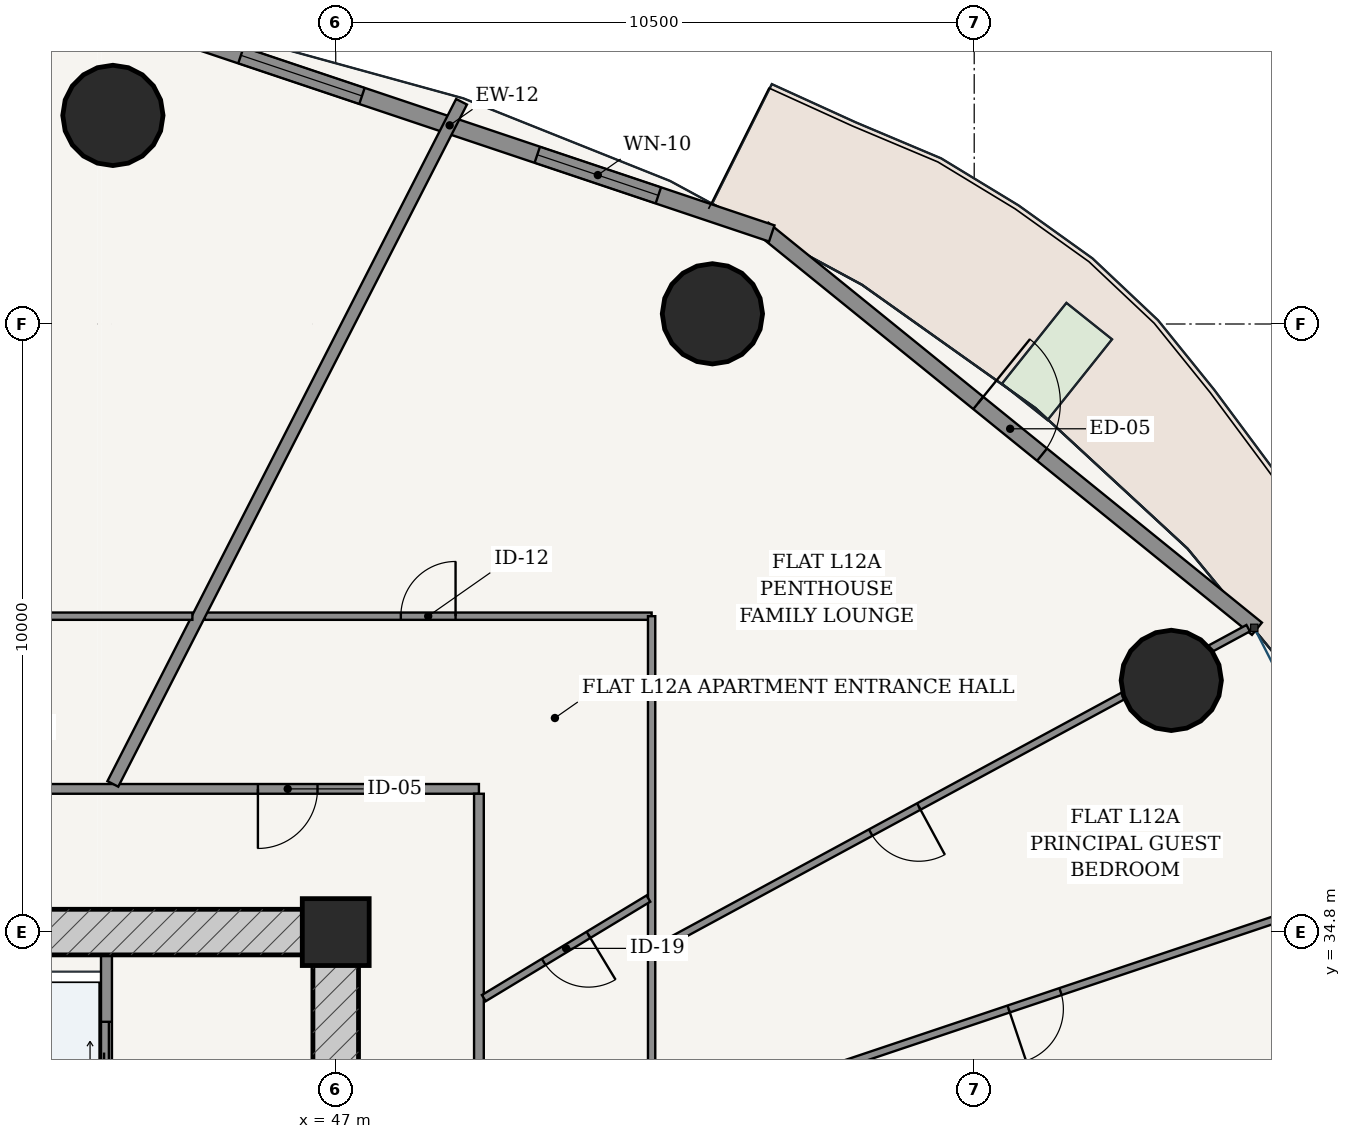
"""IFC4 building model, lengths in metres.
Left out: names, types, materials, properties, quantities, classifications, styles, units other than length and angle.
Written with IfcOpenShell. Run it as: python <this file> out.ifc"""

import sys

from ifc_helpers import new_model, si_unit, direction, frame, frame_2d, origin, origin_2d, place, context, subcontext, project, spatial, rectangle, hollow_circle, extrude, source, transform, mapped, element, fill, save


model = new_model("IFC4")
c1 = context("Model", 3, precision=1e-05, world=origin(), true_north=direction((-0.2419218956, 0.970295726276)))
c2 = subcontext(c1, "Body", "Model", "MODEL_VIEW")
j1 = project(units=[si_unit("LENGTHUNIT", "METRE"), si_unit("PLANEANGLEUNIT", "RADIAN")], contexts=[c1])
p1 = place(None, origin())
s1 = spatial("IfcSite", under=j1, at=p1, CompositionType="ELEMENT")
p2 = place(p1, origin())
s2 = spatial("IfcBuilding", under=s1, at=p2, CompositionType="ELEMENT")
p3 = place(p2, frame((0.0, 0.0, 49.2)))
s3 = spatial("IfcBuildingStorey", under=s2, at=p3, CompositionType="ELEMENT", Elevation=49.2)
p4 = place(p3, frame((47.0, 34.8, 0.0), z_axis=(0.0, 0.0, 1.0), x_axis=(1.0, 0.0, 0.0)))
e1 = element("IfcColumn", 1, at=p4, inside=s3, PredefinedType="COLUMN", context=c2, shape_type="SweptSolid", body=[
    extrude(rectangle(XDim=1.1, YDim=1.1, at=origin_2d()), origin(), (0.0, 0.0, 1.0), 3.6),
])
p5 = place(p3, frame((28.625, 34.8, 0.0), z_axis=(0.0, 0.0, 1.0), x_axis=(1.0, 0.0, 0.0)))
e2 = element("IfcWall", 2, at=p5, inside=s3, PredefinedType="SHEAR", context=c2, shape_type="SweptSolid", body=[
    extrude(rectangle(XDim=18.75, YDim=0.75, at=frame_2d((9.375, 0.0))), origin(), (0.0, 0.0, 1.0), 3.32),
])
p6 = place(p5, frame((6.887, 0.0, 0.0)))
e3 = element("IfcOpeningElement", 3, at=p6, cuts=e2, PredefinedType="OPENING", context=c2, shape_type="SweptSolid", body=[
    extrude(rectangle(XDim=0.85, YDim=2.1, at=frame_2d((0.425, 1.05))), frame((0.0, 0.385, 0.0), z_axis=(0.0, -1.0, 0.0), x_axis=(1.0, 0.0, 0.0)), (0.0, 0.0, 1.0), 0.77),
])
p7 = place(p5, frame((8.945, 0.0, 0.0)))
e4 = element("IfcOpeningElement", 4, at=p7, cuts=e2, PredefinedType="OPENING", context=c2, shape_type="SweptSolid", body=[
    extrude(rectangle(XDim=0.86, YDim=2.1, at=frame_2d((0.43, 1.05))), frame((0.0, 0.385, 0.0), z_axis=(0.0, -1.0, 0.0), x_axis=(1.0, 0.0, 0.0)), (0.0, 0.0, 1.0), 0.77),
])
p8 = place(p5, frame((11.012, 0.0, 0.0)))
e5 = element("IfcOpeningElement", 5, at=p8, cuts=e2, PredefinedType="OPENING", context=c2, shape_type="SweptSolid", body=[
    extrude(rectangle(XDim=0.85, YDim=2.1, at=frame_2d((0.425, 1.05))), frame((0.0, 0.385, 0.0), z_axis=(0.0, -1.0, 0.0), x_axis=(1.0, 0.0, 0.0)), (0.0, 0.0, 1.0), 0.77),
])
p9 = place(p3, frame((47.0, 19.175, 0.0), z_axis=(0.0, 0.0, 1.0), x_axis=(0.0, 1.0, 0.0)))
e6 = element("IfcWall", 6, at=p9, inside=s3, PredefinedType="SHEAR", context=c2, shape_type="SweptSolid", body=[
    extrude(rectangle(XDim=15.25, YDim=0.75, at=frame_2d((7.625, 0.0))), origin(), (0.0, 0.0, 1.0), 3.32),
])
p10 = place(p9, frame((9.875, 0.0, 0.0)))
e7 = element("IfcOpeningElement", 7, at=p10, cuts=e6, PredefinedType="OPENING", context=c2, shape_type="SweptSolid", body=[
    extrude(rectangle(XDim=1.5, YDim=2.2, at=frame_2d((0.75, 1.1))), frame((0.0, 0.385, 0.0), z_axis=(0.0, -1.0, 0.0), x_axis=(1.0, 0.0, 0.0)), (0.0, 0.0, 1.0), 0.77),
])
for number, where, z_axis, x_axis in (
    (8, (60.741, 38.939, 0.0), (0.0, 0.0, 1.0), (1.0, 0.0, 0.0)),
    (9, (53.195, 44.968, 0.0), (0.0, 0.0, 1.0), (1.0, 0.0, 0.0)),
    (10, (43.336, 48.23, 0.0), (0.0, 0.0, 1.0), (1.0, 0.0, 0.0)),
):
    element("IfcColumn", number, at=place(p3, frame(where, z_axis=z_axis, x_axis=x_axis)), inside=s3, PredefinedType="COLUMN", context=c2, shape_type="SweptSolid", body=[
        extrude(hollow_circle(Radius=0.825, WallThickness=0.05, at=origin_2d()), origin(), (0.0, 0.0, 1.0), 3.6),
    ])
p11 = place(p3, frame((62.15, 39.789, 0.0), z_axis=(0.0, 0.0, 1.0), x_axis=(-0.777005352078, 0.62949398952, 0.0)))
e11 = element("IfcWall", 11, at=p11, inside=s3, PredefinedType="SOLIDWALL", context=c2, shape_type="SweptSolid", body=[
    extrude(rectangle(XDim=10.447, YDim=0.26, at=frame_2d((5.223, 0.0))), origin(), (0.0, 0.0, 1.0), 3.32),
])
p12 = place(p11, frame((4.548, 0.0, 0.0)))
e12 = element("IfcOpeningElement", 12, at=p12, cuts=e11, PredefinedType="OPENING", context=c2, shape_type="SweptSolid", body=[
    extrude(rectangle(XDim=1.35, YDim=2.2, at=frame_2d((0.675, 1.1))), frame((0.0, 0.14, 0.0), z_axis=(0.0, -1.0, 0.0), x_axis=(1.0, 0.0, 0.0)), (0.0, 0.0, 1.0), 0.28),
])
p13 = place(p3, frame((54.171, 46.289, 0.0), z_axis=(0.0, 0.0, 1.0), x_axis=(-0.948041258496, 0.318147406385, 0.0)))
e13 = element("IfcWall", 13, at=p13, inside=s3, PredefinedType="SOLIDWALL", context=c2, shape_type="SweptSolid", body=[
    extrude(rectangle(XDim=11.175, YDim=0.28, at=frame_2d((5.588, 0.0))), origin(), (0.0, 0.0, 1.0), 3.32),
])
p14 = place(p13, frame((1.967, 0.0, 0.85)))
e14 = element("IfcOpeningElement", 14, at=p14, cuts=e13, PredefinedType="OPENING", context=c2, shape_type="SweptSolid", body=[
    extrude(rectangle(XDim=2.1, YDim=1.95, at=frame_2d((1.05, 0.975))), frame((0.0, 0.15, 0.0), z_axis=(0.0, -1.0, 0.0), x_axis=(1.0, 0.0, 0.0)), (0.0, 0.0, 1.0), 0.3),
])
p15 = place(p13, frame((7.108, 0.0, 0.85)))
e15 = element("IfcOpeningElement", 15, at=p15, cuts=e13, PredefinedType="OPENING", context=c2, shape_type="SweptSolid", body=[
    extrude(rectangle(XDim=2.1, YDim=1.95, at=frame_2d((1.05, 0.975))), frame((0.0, 0.15, 0.0), z_axis=(0.0, -1.0, 0.0), x_axis=(1.0, 0.0, 0.0)), (0.0, 0.0, 1.0), 0.3),
])
p16 = place(p3, frame((43.23, 28.52, 0.0), z_axis=(0.0, 0.0, 1.0), x_axis=(0.0, 1.0, 0.0)))
e16 = element("IfcWall", 16, at=p16, inside=s3, PredefinedType="PARTITIONING", context=c2, shape_type="SweptSolid", body=[
    extrude(rectangle(XDim=5.905, YDim=0.18, at=frame_2d((2.953, 0.0))), origin(), (0.0, 0.0, 1.0), 3.32),
])
p17 = place(p16, frame((0.905, 0.0, 0.0)))
e17 = element("IfcOpeningElement", 17, at=p17, cuts=e16, PredefinedType="OPENING", context=c2, shape_type="SweptSolid", body=[
    extrude(rectangle(XDim=0.85, YDim=2.1, at=frame_2d((0.425, 1.05))), frame((0.0, 0.1, 0.0), z_axis=(0.0, -1.0, 0.0), x_axis=(1.0, 0.0, 0.0)), (0.0, 0.0, 1.0), 0.2),
])
p18 = place(p16, frame((3.655, 0.0, 0.0)))
e18 = element("IfcOpeningElement", 18, at=p18, cuts=e16, PredefinedType="OPENING", context=c2, shape_type="SweptSolid", body=[
    extrude(rectangle(XDim=1.15, YDim=2.2, at=frame_2d((0.575, 1.1))), frame((0.0, 0.1, 0.0), z_axis=(0.0, -1.0, 0.0), x_axis=(1.0, 0.0, 0.0)), (0.0, 0.0, 1.0), 0.2),
])
p19 = place(p3, frame((26.645, 37.155, 0.0), z_axis=(0.0, 0.0, 1.0), x_axis=(1.0, 0.0, 0.0)))
e19 = element("IfcWall", 19, at=p19, inside=s3, PredefinedType="PARTITIONING", context=c2, shape_type="SweptSolid", body=[
    extrude(rectangle(XDim=22.71, YDim=0.16, at=frame_2d((11.355, 0.0))), origin(), (0.0, 0.0, 1.0), 2.688),
])
p20 = place(p19, frame((19.075, 0.0, 0.0)))
e20 = element("IfcOpeningElement", 20, at=p20, cuts=e19, PredefinedType="OPENING", context=c2, shape_type="SweptSolid", body=[
    extrude(rectangle(XDim=0.98, YDim=2.2, at=frame_2d((0.49, 1.1))), frame((0.0, 0.09, 0.0), z_axis=(0.0, -1.0, 0.0), x_axis=(1.0, 0.0, 0.0)), (0.0, 0.0, 1.0), 0.18),
])
p21 = place(p19, frame((6.221, 0.0, 0.0)))
e21 = element("IfcOpeningElement", 21, at=p21, cuts=e19, PredefinedType="OPENING", context=c2, shape_type="SweptSolid", body=[
    extrude(rectangle(XDim=0.98, YDim=2.2, at=frame_2d((0.49, 1.1))), frame((0.0, 0.09, 0.0), z_axis=(0.0, -1.0, 0.0), x_axis=(1.0, 0.0, 0.0)), (0.0, 0.0, 1.0), 0.18),
])
p22 = place(p3, frame((49.355, 16.525, 0.0), z_axis=(0.0, 0.0, 1.0), x_axis=(0.0, 1.0, 0.0)))
e22 = element("IfcWall", 22, at=p22, inside=s3, PredefinedType="PARTITIONING", context=c2, shape_type="SweptSolid", body=[
    extrude(rectangle(XDim=20.55, YDim=0.16, at=frame_2d((10.275, 0.0))), origin(), (0.0, 0.0, 1.0), 2.688),
])
p23 = place(p3, frame((44.847, 39.995, 0.0), z_axis=(0.0, 0.0, 1.0), x_axis=(1.0, 0.0, 0.0)))
e23 = element("IfcWall", 23, at=p23, inside=s3, PredefinedType="PARTITIONING", context=c2, shape_type="SweptSolid", body=[
    extrude(rectangle(XDim=7.348, YDim=0.12, at=frame_2d((3.674, 0.0))), origin(), (0.0, 0.0, 1.0), 2.688),
])
p24 = place(p23, frame((3.224, 0.0, 0.0)))
e24 = element("IfcOpeningElement", 24, at=p24, cuts=e23, PredefinedType="OPENING", context=c2, shape_type="SweptSolid", body=[
    extrude(rectangle(XDim=0.9, YDim=2.15, at=frame_2d((0.45, 1.075))), frame((0.0, 0.07, 0.0), z_axis=(0.0, -1.0, 0.0), x_axis=(1.0, 0.0, 0.0)), (0.0, 0.0, 1.0), 0.14),
])
p25 = place(p3, frame((52.195, 39.995, 0.0), z_axis=(0.0, 0.0, 1.0), x_axis=(0.0, -1.0, 0.0)))
e25 = element("IfcWall", 25, at=p25, inside=s3, PredefinedType="PARTITIONING", context=c2, shape_type="SweptSolid", body=[
    extrude(rectangle(XDim=20.779, YDim=0.12, at=frame_2d((10.39, 0.0))), origin(), (0.0, 0.0, 1.0), 2.688),
])
p26 = place(p25, frame((13.944, 0.0, 0.0)))
e26 = element("IfcOpeningElement", 26, at=p26, cuts=e25, PredefinedType="OPENING", context=c2, shape_type="SweptSolid", body=[
    extrude(rectangle(XDim=0.9, YDim=2.15, at=frame_2d((0.45, 1.075))), frame((0.0, 0.07, 0.0), z_axis=(0.0, -1.0, 0.0), x_axis=(1.0, 0.0, 0.0)), (0.0, 0.0, 1.0), 0.14),
])
p27 = place(p25, frame((17.655, 0.0, 0.0)))
e27 = element("IfcOpeningElement", 27, at=p27, cuts=e25, PredefinedType="OPENING", context=c2, shape_type="SweptSolid", body=[
    extrude(rectangle(XDim=0.9, YDim=2.15, at=frame_2d((0.45, 1.075))), frame((0.0, 0.07, 0.0), z_axis=(0.0, -1.0, 0.0), x_axis=(1.0, 0.0, 0.0)), (0.0, 0.0, 1.0), 0.14),
])
p28 = place(p3, frame((52.254, 31.584, 0.0), z_axis=(0.0, 0.0, 1.0), x_axis=(0.948022802246, 0.318202398516, 0.0)))
e28 = element("IfcWall", 28, at=p28, inside=s3, PredefinedType="PARTITIONING", context=c2, shape_type="SweptSolid", body=[
    extrude(rectangle(XDim=13.163, YDim=0.12, at=frame_2d((6.582, 0.0))), origin(), (0.0, 0.0, 1.0), 2.762),
])
p29 = place(p28, frame((6.131, 0.0, 0.0)))
e29 = element("IfcOpeningElement", 29, at=p29, cuts=e28, PredefinedType="OPENING", context=c2, shape_type="SweptSolid", body=[
    extrude(rectangle(XDim=0.9, YDim=2.15, at=frame_2d((0.45, 1.075))), frame((0.0, 0.07, 0.0), z_axis=(0.0, -1.0, 0.0), x_axis=(1.0, 0.0, 0.0)), (0.0, 0.0, 1.0), 0.14),
])
p30 = place(p3, frame((52.25, 34.515, 0.0), z_axis=(0.0, 0.0, 1.0), x_axis=(0.879370672984, 0.476137815654, 0.0)))
e30 = element("IfcWall", 30, at=p30, inside=s3, PredefinedType="PARTITIONING", context=c2, shape_type="SweptSolid", body=[
    extrude(rectangle(XDim=11.094, YDim=0.12, at=frame_2d((5.547, 0.0))), origin(), (0.0, 0.0, 1.0), 2.688),
])
p31 = place(p30, frame((4.034, 0.0, 0.0)))
e31 = element("IfcOpeningElement", 31, at=p31, cuts=e30, PredefinedType="OPENING", context=c2, shape_type="SweptSolid", body=[
    extrude(rectangle(XDim=0.9, YDim=2.15, at=frame_2d((0.45, 1.075))), frame((0.0, 0.07, 0.0), z_axis=(0.0, -1.0, 0.0), x_axis=(1.0, 0.0, 0.0)), (0.0, 0.0, 1.0), 0.14),
])
p32 = place(p3, frame((49.435, 33.714, 0.0), z_axis=(0.0, 0.0, 1.0), x_axis=(0.855724035959, 0.517432482824, 0.0)))
e32 = element("IfcWall", 32, at=p32, inside=s3, PredefinedType="PARTITIONING", context=c2, shape_type="SweptSolid", body=[
    extrude(rectangle(XDim=3.163, YDim=0.12, at=frame_2d((1.582, 0.0))), origin(), (0.0, 0.0, 1.0), 3.32),
])
p33 = place(p32, frame((1.152, 0.0, 0.0)))
e33 = element("IfcOpeningElement", 33, at=p33, cuts=e32, PredefinedType="OPENING", context=c2, shape_type="SweptSolid", body=[
    extrude(rectangle(XDim=0.86, YDim=2.15, at=frame_2d((0.43, 1.075))), frame((0.0, 0.07, 0.0), z_axis=(0.0, -1.0, 0.0), x_axis=(1.0, 0.0, 0.0)), (0.0, 0.0, 1.0), 0.14),
])
p34 = place(p3, frame((43.335, 37.237, 0.0), z_axis=(0.0, 0.0, 1.0), x_axis=(0.455148959499, 0.890415310216, 0.0)))
e34 = element("IfcWall", 34, at=p34, inside=s3, PredefinedType="PARTITIONING", context=c2, shape_type="SweptSolid", body=[
    extrude(rectangle(XDim=12.598, YDim=0.2, at=frame_2d((6.299, 0.0))), origin(), (0.0, 0.0, 1.0), 2.762),
])
p35 = place(p3, frame((23.805, 39.995, 0.0), z_axis=(0.0, 0.0, 1.0), x_axis=(1.0, 0.0, 0.0)))
e35 = element("IfcWall", 35, at=p35, inside=s3, PredefinedType="PARTITIONING", context=c2, shape_type="SweptSolid", body=[
    extrude(rectangle(XDim=20.838, YDim=0.12, at=frame_2d((10.419, 0.0))), origin(), (0.0, 0.0, 1.0), 2.688),
])
p36 = place(p35, frame((11.931, 0.0, 0.0)))
e36 = element("IfcOpeningElement", 36, at=p36, cuts=e35, PredefinedType="OPENING", context=c2, shape_type="SweptSolid", body=[
    extrude(rectangle(XDim=0.9, YDim=2.15, at=frame_2d((0.45, 1.075))), frame((0.0, 0.07, 0.0), z_axis=(0.0, -1.0, 0.0), x_axis=(1.0, 0.0, 0.0)), (0.0, 0.0, 1.0), 0.14),
])
m1 = source(origin(), c2, "Body", "SweptSolid", [
    extrude(rectangle(XDim=1.35, YDim=2.2, at=frame_2d((0.675, 1.1))), frame((0.0, 0.025, 0.0), z_axis=(0.0, -1.0, 0.0), x_axis=(1.0, 0.0, 0.0)), (0.0, 0.0, 1.0), 0.05),
])
p37 = place(p12, frame((1.35, 0.0, 0.0), z_axis=(0.0, 0.0, 1.0), x_axis=(-1.0, 0.0, 0.0)))
e37 = element("IfcDoor", 37, at=p37, inside=s3, OperationType="SINGLE_SWING_LEFT", PredefinedType="DOOR", context=c2, shape_type="MappedRepresentation", body=[
    mapped(m1, transform((0.0, 0.0, 0.0), scale=1.0)),
])
fill(e12, e37)
m2 = source(origin(), c2, "Body", "SweptSolid", [
    extrude(rectangle(XDim=2.1, YDim=1.95, at=frame_2d((1.05, 0.975))), frame((0.0, 0.03, 0.0), z_axis=(0.0, -1.0, 0.0), x_axis=(1.0, 0.0, 0.0)), (0.0, 0.0, 1.0), 0.06),
])
p38 = place(p14, origin())
e38 = element("IfcWindow", 38, at=p38, inside=s3, PartitioningType="SINGLE_PANEL", PredefinedType="WINDOW", context=c2, shape_type="MappedRepresentation", body=[
    mapped(m2, transform((0.0, 0.0, 0.0), scale=1.0)),
])
fill(e14, e38)
p39 = place(p15, origin())
e39 = element("IfcWindow", 39, at=p39, inside=s3, PartitioningType="SINGLE_PANEL", PredefinedType="WINDOW", context=c2, shape_type="MappedRepresentation", body=[
    mapped(m2, transform((0.0, 0.0, 0.0), scale=1.0)),
])
fill(e15, e39)
m3 = source(origin(), c2, "Body", "SweptSolid", [
    extrude(rectangle(XDim=1.15, YDim=2.2, at=frame_2d((0.575, 1.1))), frame((0.0, 0.025, 0.0), z_axis=(0.0, -1.0, 0.0), x_axis=(1.0, 0.0, 0.0)), (0.0, 0.0, 1.0), 0.05),
])
p40 = place(p18, origin())
e40 = element("IfcDoor", 40, at=p40, inside=s3, OperationType="DOUBLE_DOOR_SLIDING", PredefinedType="DOOR", context=c2, shape_type="MappedRepresentation", body=[
    mapped(m3, transform((0.0, 0.0, 0.0), scale=1.0)),
])
fill(e18, e40)
m4 = source(origin(), c2, "Body", "SweptSolid", [
    extrude(rectangle(XDim=0.98, YDim=2.2, at=frame_2d((0.49, 1.1))), frame((0.0, 0.025, 0.0), z_axis=(0.0, -1.0, 0.0), x_axis=(1.0, 0.0, 0.0)), (0.0, 0.0, 1.0), 0.05),
])
p41 = place(p20, frame((0.98, 0.0, 0.0), z_axis=(0.0, 0.0, 1.0), x_axis=(-1.0, 0.0, 0.0)))
e41 = element("IfcDoor", 41, at=p41, inside=s3, OperationType="SINGLE_SWING_RIGHT", PredefinedType="DOOR", context=c2, shape_type="MappedRepresentation", body=[
    mapped(m4, transform((0.0, 0.0, 0.0), scale=1.0)),
])
fill(e20, e41)
m5 = source(origin(), c2, "Body", "SweptSolid", [
    extrude(rectangle(XDim=0.86, YDim=2.15, at=frame_2d((0.43, 1.075))), frame((0.0, 0.025, 0.0), z_axis=(0.0, -1.0, 0.0), x_axis=(1.0, 0.0, 0.0)), (0.0, 0.0, 1.0), 0.05),
])
p42 = place(p33, frame((0.86, 0.0, 0.0), z_axis=(0.0, 0.0, 1.0), x_axis=(-1.0, 0.0, 0.0)))
e42 = element("IfcDoor", 42, at=p42, inside=s3, OperationType="SINGLE_SWING_LEFT", PredefinedType="DOOR", context=c2, shape_type="MappedRepresentation", body=[
    mapped(m5, transform((0.0, 0.0, 0.0), scale=1.0)),
])
fill(e33, e42)
m6 = source(origin(), c2, "Body", "SweptSolid", [
    extrude(rectangle(XDim=0.9, YDim=2.15, at=frame_2d((0.45, 1.075))), frame((0.0, 0.025, 0.0), z_axis=(0.0, -1.0, 0.0), x_axis=(1.0, 0.0, 0.0)), (0.0, 0.0, 1.0), 0.05),
])
p43 = place(p24, origin())
e43 = element("IfcDoor", 43, at=p43, inside=s3, OperationType="SINGLE_SWING_RIGHT", PredefinedType="DOOR", context=c2, shape_type="MappedRepresentation", body=[
    mapped(m6, transform((0.0, 0.0, 0.0), scale=1.0)),
])
fill(e24, e43)
p44 = place(p31, frame((0.9, 0.0, 0.0), z_axis=(0.0, 0.0, 1.0), x_axis=(-1.0, 0.0, 0.0)))
e44 = element("IfcDoor", 44, at=p44, inside=s3, OperationType="SINGLE_SWING_LEFT", PredefinedType="DOOR", context=c2, shape_type="MappedRepresentation", body=[
    mapped(m6, transform((0.0, 0.0, 0.0), scale=1.0)),
])
fill(e31, e44)
p45 = place(p29, frame((0.9, 0.0, 0.0), z_axis=(0.0, 0.0, 1.0), x_axis=(-1.0, 0.0, 0.0)))
e45 = element("IfcDoor", 45, at=p45, inside=s3, OperationType="SINGLE_SWING_RIGHT", PredefinedType="DOOR", context=c2, shape_type="MappedRepresentation", body=[
    mapped(m6, transform((0.0, 0.0, 0.0), scale=1.0)),
])
fill(e29, e45)
save(model, sys.argv[1])
